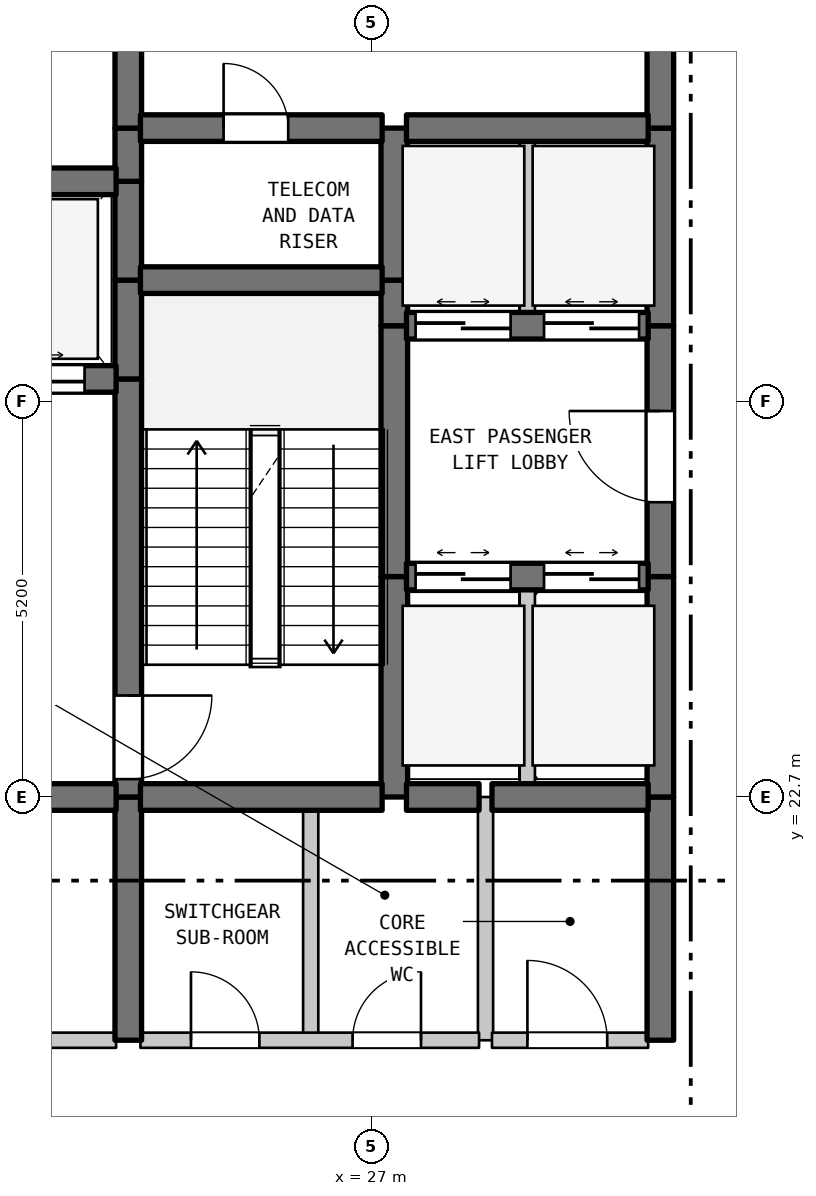
"""IFC4 building model, lengths in metres.
Left out: names, types, materials, properties, quantities, classifications, styles, units other than length and angle.
Written with IfcOpenShell. Run it as: python <this file> out.ifc"""

import sys

from ifc_helpers import new_model, si_unit, direction, frame, frame_2d, origin, place, context, subcontext, project, spatial, rectangle, extrude, element, fill, save


model = new_model("IFC4")
c1 = context("Model", 3, precision=1e-05, world=origin(), true_north=direction((0.0, 1.0)))
c2 = subcontext(c1, "Body", "Model", "MODEL_VIEW")
j1 = project(units=[si_unit("LENGTHUNIT", "METRE"), si_unit("PLANEANGLEUNIT", "RADIAN")], contexts=[c1])
p1 = place(None, origin())
s1 = spatial("IfcSite", under=j1, at=p1, CompositionType="ELEMENT")
p2 = place(p1, origin())
s2 = spatial("IfcBuilding", under=s1, at=p2, CompositionType="ELEMENT")
p3 = place(p2, frame((0.0, 0.0, 120.5)))
s3 = spatial("IfcBuildingStorey", under=s2, at=p3, CompositionType="ELEMENT", Elevation=120.5)
p4 = place(p3, frame((23.8, 19.5, 0.0), z_axis=(0.0, 0.0, 1.0), x_axis=(0.0, 1.0, 0.0)))
e1 = element("IfcWall", 1, at=p4, inside=s3, PredefinedType="SHEAR", context=c2, shape_type="SweptSolid", body=[
    extrude(rectangle(XDim=3.2, YDim=0.35, at=frame_2d((1.6, 0.0))), origin(), (0.0, 0.0, 1.0), 4.48),
])
p5 = place(p3, frame((23.8, 22.7, 0.0), z_axis=(0.0, 0.0, 1.0), x_axis=(0.0, 1.0, 0.0)))
e2 = element("IfcWall", 2, at=p5, inside=s3, PredefinedType="SHEAR", context=c2, shape_type="SweptSolid", body=[
    extrude(rectangle(XDim=5.5, YDim=0.35, at=frame_2d((2.75, 0.0))), origin(), (0.0, 0.0, 1.0), 4.48),
])
p6 = place(p5, frame((0.235, 0.0, 0.0)))
e3 = element("IfcOpeningElement", 3, at=p6, cuts=e2, PredefinedType="OPENING", context=c2, shape_type="SweptSolid", body=[
    extrude(rectangle(XDim=1.1, YDim=2.15, at=frame_2d((0.55, 1.075))), frame((0.0, 0.185, 0.0), z_axis=(0.0, -1.0, 0.0), x_axis=(1.0, 0.0, 0.0)), (0.0, 0.0, 1.0), 0.37),
])
for number, where, z_axis, x_axis in (
    (4, (23.8, 28.2, 0.0), (0.0, 0.0, 1.0), (0.0, 1.0, 0.0)),
    (5, (23.8, 29.5, 0.0), (0.0, 0.0, 1.0), (0.0, 1.0, 0.0)),
):
    element("IfcWall", number, at=place(p3, frame(where, z_axis=z_axis, x_axis=x_axis)), inside=s3, PredefinedType="SHEAR", context=c2, shape_type="SweptSolid", body=[
        extrude(rectangle(XDim=1.3, YDim=0.35, at=frame_2d((0.65, 0.0))), origin(), (0.0, 0.0, 1.0), 4.48),
    ])
p7 = place(p3, frame((23.8, 30.8, 0.0), z_axis=(0.0, 0.0, 1.0), x_axis=(0.0, 1.0, 0.0)))
e6 = element("IfcWall", 6, at=p7, inside=s3, PredefinedType="SHEAR", context=c2, shape_type="SweptSolid", body=[
    extrude(rectangle(XDim=0.7, YDim=0.35, at=frame_2d((0.35, 0.0))), origin(), (0.0, 0.0, 1.0), 4.48),
])
p8 = place(p3, frame((23.8, 31.5, 0.0), z_axis=(0.0, 0.0, 1.0), x_axis=(0.0, 1.0, 0.0)))
e7 = element("IfcWall", 7, at=p8, inside=s3, PredefinedType="SHEAR", context=c2, shape_type="SweptSolid", body=[
    extrude(rectangle(XDim=3.5, YDim=0.35, at=frame_2d((1.75, 0.0))), origin(), (0.0, 0.0, 1.0), 4.48),
])
p9 = place(p8, frame((1.127, 0.0, 0.0)))
e8 = element("IfcOpeningElement", 8, at=p9, cuts=e7, PredefinedType="OPENING", context=c2, shape_type="SweptSolid", body=[
    extrude(rectangle(XDim=1.1, YDim=2.15, at=frame_2d((0.55, 1.075))), frame((0.0, 0.185, 0.0), z_axis=(0.0, -1.0, 0.0), x_axis=(1.0, 0.0, 0.0)), (0.0, 0.0, 1.0), 0.37),
])
p10 = place(p3, frame((26.2, 19.5, 0.0), z_axis=(0.0, 0.0, 1.0), x_axis=(0.0, 1.0, 0.0)))
e9 = element("IfcWall", 9, at=p10, inside=s3, PredefinedType="STANDARD", context=c2, shape_type="SweptSolid", body=[
    extrude(rectangle(XDim=3.2, YDim=0.2, at=frame_2d((1.6, 0.0))), origin(), (0.0, 0.0, 1.0), 4.48),
])
p11 = place(p3, frame((27.3, 22.7, 0.0), z_axis=(0.0, 0.0, 1.0), x_axis=(0.0, 1.0, 0.0)))
e10 = element("IfcWall", 10, at=p11, inside=s3, PredefinedType="SHEAR", context=c2, shape_type="SweptSolid", body=[
    extrude(rectangle(XDim=2.9, YDim=0.35, at=frame_2d((1.45, 0.0))), origin(), (0.0, 0.0, 1.0), 4.48),
])
p12 = place(p3, frame((27.3, 25.6, 0.0), z_axis=(0.0, 0.0, 1.0), x_axis=(0.0, 1.0, 0.0)))
e11 = element("IfcWall", 11, at=p12, inside=s3, PredefinedType="SHEAR", context=c2, shape_type="SweptSolid", body=[
    extrude(rectangle(XDim=3.3, YDim=0.35, at=frame_2d((1.65, 0.0))), origin(), (0.0, 0.0, 1.0), 4.48),
])
p13 = place(p3, frame((27.3, 28.9, 0.0), z_axis=(0.0, 0.0, 1.0), x_axis=(0.0, 1.0, 0.0)))
e12 = element("IfcWall", 12, at=p13, inside=s3, PredefinedType="SHEAR", context=c2, shape_type="SweptSolid", body=[
    extrude(rectangle(XDim=0.6, YDim=0.35, at=frame_2d((0.3, 0.0))), origin(), (0.0, 0.0, 1.0), 4.48),
])
p14 = place(p3, frame((27.3, 29.5, 0.0), z_axis=(0.0, 0.0, 1.0), x_axis=(0.0, 1.0, 0.0)))
e13 = element("IfcWall", 13, at=p14, inside=s3, PredefinedType="SHEAR", context=c2, shape_type="SweptSolid", body=[
    extrude(rectangle(XDim=2.0, YDim=0.35, at=frame_2d((1.0, 0.0))), origin(), (0.0, 0.0, 1.0), 4.48),
])
p15 = place(p3, frame((28.5, 19.5, 0.0), z_axis=(0.0, 0.0, 1.0), x_axis=(0.0, 1.0, 0.0)))
e14 = element("IfcWall", 14, at=p15, inside=s3, PredefinedType="STANDARD", context=c2, shape_type="SweptSolid", body=[
    extrude(rectangle(XDim=3.2, YDim=0.2, at=frame_2d((1.6, 0.0))), origin(), (0.0, 0.0, 1.0), 4.48),
])
p16 = place(p3, frame((29.05, 22.7, 0.0), z_axis=(0.0, 0.0, 1.0), x_axis=(0.0, 1.0, 0.0)))
e15 = element("IfcWall", 15, at=p16, inside=s3, PredefinedType="STANDARD", context=c2, shape_type="SweptSolid", body=[
    extrude(rectangle(XDim=2.9, YDim=0.2, at=frame_2d((1.45, 0.0))), origin(), (0.0, 0.0, 1.0), 4.48),
])
p17 = place(p3, frame((29.05, 28.9, 0.0), z_axis=(0.0, 0.0, 1.0), x_axis=(0.0, 1.0, 0.0)))
e16 = element("IfcWall", 16, at=p17, inside=s3, PredefinedType="STANDARD", context=c2, shape_type="SweptSolid", body=[
    extrude(rectangle(XDim=2.6, YDim=0.2, at=frame_2d((1.3, 0.0))), origin(), (0.0, 0.0, 1.0), 4.48),
])
p18 = place(p3, frame((30.8, 19.5, 0.0), z_axis=(0.0, 0.0, 1.0), x_axis=(0.0, 1.0, 0.0)))
e17 = element("IfcWall", 17, at=p18, inside=s3, PredefinedType="SHEAR", context=c2, shape_type="SweptSolid", body=[
    extrude(rectangle(XDim=3.2, YDim=0.35, at=frame_2d((1.6, 0.0))), origin(), (0.0, 0.0, 1.0), 4.48),
])
p19 = place(p3, frame((30.8, 22.7, 0.0), z_axis=(0.0, 0.0, 1.0), x_axis=(0.0, 1.0, 0.0)))
e18 = element("IfcWall", 18, at=p19, inside=s3, PredefinedType="SHEAR", context=c2, shape_type="SweptSolid", body=[
    extrude(rectangle(XDim=2.9, YDim=0.35, at=frame_2d((1.45, 0.0))), origin(), (0.0, 0.0, 1.0), 4.48),
])
p20 = place(p3, frame((30.8, 25.6, 0.0), z_axis=(0.0, 0.0, 1.0), x_axis=(0.0, 1.0, 0.0)))
e19 = element("IfcWall", 19, at=p20, inside=s3, PredefinedType="SHEAR", context=c2, shape_type="SweptSolid", body=[
    extrude(rectangle(XDim=3.3, YDim=0.35, at=frame_2d((1.65, 0.0))), origin(), (0.0, 0.0, 1.0), 4.48),
])
p21 = place(p20, frame((0.978, 0.0, 0.0)))
e20 = element("IfcOpeningElement", 20, at=p21, cuts=e19, PredefinedType="OPENING", context=c2, shape_type="SweptSolid", body=[
    extrude(rectangle(XDim=1.2, YDim=2.2, at=frame_2d((0.6, 1.1))), frame((0.0, 0.185, 0.0), z_axis=(0.0, -1.0, 0.0), x_axis=(1.0, 0.0, 0.0)), (0.0, 0.0, 1.0), 0.37),
])
p22 = place(p3, frame((30.8, 28.9, 0.0), z_axis=(0.0, 0.0, 1.0), x_axis=(0.0, 1.0, 0.0)))
e21 = element("IfcWall", 21, at=p22, inside=s3, PredefinedType="SHEAR", context=c2, shape_type="SweptSolid", body=[
    extrude(rectangle(XDim=2.6, YDim=0.35, at=frame_2d((1.3, 0.0))), origin(), (0.0, 0.0, 1.0), 4.48),
])
p23 = place(p3, frame((30.8, 31.5, 0.0), z_axis=(0.0, 0.0, 1.0), x_axis=(0.0, 1.0, 0.0)))
e22 = element("IfcWall", 22, at=p23, inside=s3, PredefinedType="SHEAR", context=c2, shape_type="SweptSolid", body=[
    extrude(rectangle(XDim=3.5, YDim=0.35, at=frame_2d((1.75, 0.0))), origin(), (0.0, 0.0, 1.0), 4.48),
])
p24 = place(p23, frame((1.15, 0.0, 0.0)))
e23 = element("IfcOpeningElement", 23, at=p24, cuts=e22, PredefinedType="OPENING", context=c2, shape_type="SweptSolid", body=[
    extrude(rectangle(XDim=1.2, YDim=2.2, at=frame_2d((0.6, 1.1))), frame((0.0, 0.185, 0.0), z_axis=(0.0, -1.0, 0.0), x_axis=(1.0, 0.0, 0.0)), (0.0, 0.0, 1.0), 0.37),
])
p25 = place(p3, frame((19.16, 19.5, 0.0), z_axis=(0.0, 0.0, 1.0), x_axis=(1.0, 0.0, 0.0)))
e24 = element("IfcWall", 24, at=p25, inside=s3, PredefinedType="STANDARD", context=c2, shape_type="SweptSolid", body=[
    extrude(rectangle(XDim=4.48, YDim=0.2, at=frame_2d((2.24, 0.0))), origin(), (0.0, 0.0, 1.0), 4.48),
])
p26 = place(p25, frame((1.64, 0.0, 0.0)))
e25 = element("IfcOpeningElement", 25, at=p26, cuts=e24, PredefinedType="OPENING", context=c2, shape_type="SweptSolid", body=[
    extrude(rectangle(XDim=1.2, YDim=2.2, at=frame_2d((0.6, 1.1))), frame((0.0, 0.11, 0.0), z_axis=(0.0, -1.0, 0.0), x_axis=(1.0, 0.0, 0.0)), (0.0, 0.0, 1.0), 0.22),
])
p27 = place(p3, frame((23.96, 19.5, 0.0), z_axis=(0.0, 0.0, 1.0), x_axis=(1.0, 0.0, 0.0)))
e26 = element("IfcWall", 26, at=p27, inside=s3, PredefinedType="STANDARD", context=c2, shape_type="SweptSolid", body=[
    extrude(rectangle(XDim=4.455, YDim=0.2, at=frame_2d((2.228, 0.0))), origin(), (0.0, 0.0, 1.0), 4.48),
])
p28 = place(p27, frame((0.665, 0.0, 0.0)))
e27 = element("IfcOpeningElement", 27, at=p28, cuts=e26, PredefinedType="OPENING", context=c2, shape_type="SweptSolid", body=[
    extrude(rectangle(XDim=0.9, YDim=2.15, at=frame_2d((0.45, 1.075))), frame((0.0, 0.11, 0.0), z_axis=(0.0, -1.0, 0.0), x_axis=(1.0, 0.0, 0.0)), (0.0, 0.0, 1.0), 0.22),
])
p29 = place(p27, frame((2.791, 0.0, 0.0)))
e28 = element("IfcOpeningElement", 28, at=p29, cuts=e26, PredefinedType="OPENING", context=c2, shape_type="SweptSolid", body=[
    extrude(rectangle(XDim=0.9, YDim=2.15, at=frame_2d((0.45, 1.075))), frame((0.0, 0.11, 0.0), z_axis=(0.0, -1.0, 0.0), x_axis=(1.0, 0.0, 0.0)), (0.0, 0.0, 1.0), 0.22),
])
p30 = place(p3, frame((28.585, 19.5, 0.0), z_axis=(0.0, 0.0, 1.0), x_axis=(1.0, 0.0, 0.0)))
e29 = element("IfcWall", 29, at=p30, inside=s3, PredefinedType="STANDARD", context=c2, shape_type="SweptSolid", body=[
    extrude(rectangle(XDim=2.055, YDim=0.2, at=frame_2d((1.027, 0.0))), origin(), (0.0, 0.0, 1.0), 4.48),
])
p31 = place(p30, frame((0.466, 0.0, 0.0)))
e30 = element("IfcOpeningElement", 30, at=p31, cuts=e29, PredefinedType="OPENING", context=c2, shape_type="SweptSolid", body=[
    extrude(rectangle(XDim=1.05, YDim=2.15, at=frame_2d((0.525, 1.075))), frame((0.0, 0.11, 0.0), z_axis=(0.0, -1.0, 0.0), x_axis=(1.0, 0.0, 0.0)), (0.0, 0.0, 1.0), 0.22),
])
p32 = place(p3, frame((19.16, 22.7, 0.0), z_axis=(0.0, 0.0, 1.0), x_axis=(1.0, 0.0, 0.0)))
e31 = element("IfcWall", 31, at=p32, inside=s3, PredefinedType="SHEAR", context=c2, shape_type="SweptSolid", body=[
    extrude(rectangle(XDim=4.48, YDim=0.35, at=frame_2d((2.24, 0.0))), origin(), (0.0, 0.0, 1.0), 4.48),
])
p33 = place(p32, frame((1.64, 0.0, 0.0)))
e32 = element("IfcOpeningElement", 32, at=p33, cuts=e31, PredefinedType="OPENING", context=c2, shape_type="SweptSolid", body=[
    extrude(rectangle(XDim=1.2, YDim=2.2, at=frame_2d((0.6, 1.1))), frame((0.0, 0.185, 0.0), z_axis=(0.0, -1.0, 0.0), x_axis=(1.0, 0.0, 0.0)), (0.0, 0.0, 1.0), 0.37),
])
p34 = place(p3, frame((23.96, 22.7, 0.0), z_axis=(0.0, 0.0, 1.0), x_axis=(1.0, 0.0, 0.0)))
e33 = element("IfcWall", 33, at=p34, inside=s3, PredefinedType="SHEAR", context=c2, shape_type="SweptSolid", body=[
    extrude(rectangle(XDim=3.18, YDim=0.35, at=frame_2d((1.59, 0.0))), origin(), (0.0, 0.0, 1.0), 4.48),
])
p35 = place(p3, frame((27.46, 22.7, 0.0), z_axis=(0.0, 0.0, 1.0), x_axis=(1.0, 0.0, 0.0)))
e34 = element("IfcWall", 34, at=p35, inside=s3, PredefinedType="SHEAR", context=c2, shape_type="SweptSolid", body=[
    extrude(rectangle(XDim=0.955, YDim=0.35, at=frame_2d((0.478, 0.0))), origin(), (0.0, 0.0, 1.0), 4.48),
])
p36 = place(p3, frame((28.585, 22.7, 0.0), z_axis=(0.0, 0.0, 1.0), x_axis=(1.0, 0.0, 0.0)))
e35 = element("IfcWall", 35, at=p36, inside=s3, PredefinedType="SHEAR", context=c2, shape_type="SweptSolid", body=[
    extrude(rectangle(XDim=2.055, YDim=0.35, at=frame_2d((1.027, 0.0))), origin(), (0.0, 0.0, 1.0), 4.48),
])
p37 = place(p3, frame((27.46, 25.6, 0.0), z_axis=(0.0, 0.0, 1.0), x_axis=(1.0, 0.0, 0.0)))
e36 = element("IfcWall", 36, at=p37, inside=s3, PredefinedType="SHEAR", context=c2, shape_type="SweptSolid", body=[
    extrude(rectangle(XDim=3.18, YDim=0.35, at=frame_2d((1.59, 0.0))), origin(), (0.0, 0.0, 1.0), 4.48),
])
p38 = place(p37, frame((0.12, 0.0, 0.0)))
e37 = element("IfcOpeningElement", 37, at=p38, cuts=e36, PredefinedType="OPENING", context=c2, shape_type="SweptSolid", body=[
    extrude(rectangle(XDim=1.25, YDim=2.2, at=frame_2d((0.625, 1.1))), frame((0.0, 0.185, 0.0), z_axis=(0.0, -1.0, 0.0), x_axis=(1.0, 0.0, 0.0)), (0.0, 0.0, 1.0), 0.37),
])
p39 = place(p37, frame((1.81, 0.0, 0.0)))
e38 = element("IfcOpeningElement", 38, at=p39, cuts=e36, PredefinedType="OPENING", context=c2, shape_type="SweptSolid", body=[
    extrude(rectangle(XDim=1.25, YDim=2.2, at=frame_2d((0.625, 1.1))), frame((0.0, 0.185, 0.0), z_axis=(0.0, -1.0, 0.0), x_axis=(1.0, 0.0, 0.0)), (0.0, 0.0, 1.0), 0.37),
])
p40 = place(p3, frame((19.16, 28.2, 0.0), z_axis=(0.0, 0.0, 1.0), x_axis=(1.0, 0.0, 0.0)))
e39 = element("IfcWall", 39, at=p40, inside=s3, PredefinedType="SHEAR", context=c2, shape_type="SweptSolid", body=[
    extrude(rectangle(XDim=4.48, YDim=0.35, at=frame_2d((2.24, 0.0))), origin(), (0.0, 0.0, 1.0), 4.48),
])
p41 = place(p40, frame((0.415, 0.0, 0.0)))
e40 = element("IfcOpeningElement", 40, at=p41, cuts=e39, PredefinedType="OPENING", context=c2, shape_type="SweptSolid", body=[
    extrude(rectangle(XDim=1.25, YDim=2.2, at=frame_2d((0.625, 1.1))), frame((0.0, 0.185, 0.0), z_axis=(0.0, -1.0, 0.0), x_axis=(1.0, 0.0, 0.0)), (0.0, 0.0, 1.0), 0.37),
])
p42 = place(p40, frame((2.815, 0.0, 0.0)))
e41 = element("IfcOpeningElement", 41, at=p42, cuts=e39, PredefinedType="OPENING", context=c2, shape_type="SweptSolid", body=[
    extrude(rectangle(XDim=1.25, YDim=2.2, at=frame_2d((0.625, 1.1))), frame((0.0, 0.185, 0.0), z_axis=(0.0, -1.0, 0.0), x_axis=(1.0, 0.0, 0.0)), (0.0, 0.0, 1.0), 0.37),
])
p43 = place(p3, frame((27.46, 28.9, 0.0), z_axis=(0.0, 0.0, 1.0), x_axis=(1.0, 0.0, 0.0)))
e42 = element("IfcWall", 42, at=p43, inside=s3, PredefinedType="SHEAR", context=c2, shape_type="SweptSolid", body=[
    extrude(rectangle(XDim=3.18, YDim=0.35, at=frame_2d((1.59, 0.0))), origin(), (0.0, 0.0, 1.0), 4.48),
])
p44 = place(p43, frame((0.12, 0.0, 0.0)))
e43 = element("IfcOpeningElement", 43, at=p44, cuts=e42, PredefinedType="OPENING", context=c2, shape_type="SweptSolid", body=[
    extrude(rectangle(XDim=1.25, YDim=2.2, at=frame_2d((0.625, 1.1))), frame((0.0, 0.185, 0.0), z_axis=(0.0, -1.0, 0.0), x_axis=(1.0, 0.0, 0.0)), (0.0, 0.0, 1.0), 0.37),
])
p45 = place(p43, frame((1.81, 0.0, 0.0)))
e44 = element("IfcOpeningElement", 44, at=p45, cuts=e42, PredefinedType="OPENING", context=c2, shape_type="SweptSolid", body=[
    extrude(rectangle(XDim=1.25, YDim=2.2, at=frame_2d((0.625, 1.1))), frame((0.0, 0.185, 0.0), z_axis=(0.0, -1.0, 0.0), x_axis=(1.0, 0.0, 0.0)), (0.0, 0.0, 1.0), 0.37),
])
p46 = place(p3, frame((23.96, 29.5, 0.0), z_axis=(0.0, 0.0, 1.0), x_axis=(1.0, 0.0, 0.0)))
e45 = element("IfcWall", 45, at=p46, inside=s3, PredefinedType="SHEAR", context=c2, shape_type="SweptSolid", body=[
    extrude(rectangle(XDim=3.18, YDim=0.35, at=frame_2d((1.59, 0.0))), origin(), (0.0, 0.0, 1.0), 4.48),
])
p47 = place(p3, frame((19.16, 30.8, 0.0), z_axis=(0.0, 0.0, 1.0), x_axis=(1.0, 0.0, 0.0)))
e46 = element("IfcWall", 46, at=p47, inside=s3, PredefinedType="SHEAR", context=c2, shape_type="SweptSolid", body=[
    extrude(rectangle(XDim=4.48, YDim=0.35, at=frame_2d((2.24, 0.0))), origin(), (0.0, 0.0, 1.0), 4.48),
])
p48 = place(p3, frame((23.96, 31.5, 0.0), z_axis=(0.0, 0.0, 1.0), x_axis=(1.0, 0.0, 0.0)))
e47 = element("IfcWall", 47, at=p48, inside=s3, PredefinedType="SHEAR", context=c2, shape_type="SweptSolid", body=[
    extrude(rectangle(XDim=3.18, YDim=0.35, at=frame_2d((1.59, 0.0))), origin(), (0.0, 0.0, 1.0), 4.48),
])
p49 = place(p48, frame((1.094, 0.0, 0.0)))
e48 = element("IfcOpeningElement", 48, at=p49, cuts=e47, PredefinedType="OPENING", context=c2, shape_type="SweptSolid", body=[
    extrude(rectangle(XDim=0.85, YDim=2.1, at=frame_2d((0.425, 1.05))), frame((0.0, 0.185, 0.0), z_axis=(0.0, -1.0, 0.0), x_axis=(1.0, 0.0, 0.0)), (0.0, 0.0, 1.0), 0.37),
])
p50 = place(p3, frame((27.46, 31.5, 0.0), z_axis=(0.0, 0.0, 1.0), x_axis=(1.0, 0.0, 0.0)))
e49 = element("IfcWall", 49, at=p50, inside=s3, PredefinedType="SHEAR", context=c2, shape_type="SweptSolid", body=[
    extrude(rectangle(XDim=3.18, YDim=0.35, at=frame_2d((1.59, 0.0))), origin(), (0.0, 0.0, 1.0), 4.48),
])
p51 = place(p6, frame((1.1, 0.0, 0.0), z_axis=(0.0, 0.0, 1.0), x_axis=(-1.0, 0.0, 0.0)))
e50 = element("IfcDoor", 50, at=p51, inside=s3, OperationType="SINGLE_SWING_RIGHT", PredefinedType="DOOR", context=c2, shape_type="SweptSolid", body=[
    extrude(rectangle(XDim=1.1, YDim=2.15, at=frame_2d((0.55, 1.075))), frame((0.0, 0.025, 0.0), z_axis=(0.0, -1.0, 0.0), x_axis=(1.0, 0.0, 0.0)), (0.0, 0.0, 1.0), 0.05),
])
fill(e3, e50)
p52 = place(p21, origin())
e51 = element("IfcDoor", 51, at=p52, inside=s3, OperationType="SINGLE_SWING_RIGHT", PredefinedType="DOOR", context=c2, shape_type="SweptSolid", body=[
    extrude(rectangle(XDim=1.2, YDim=2.2, at=frame_2d((0.6, 1.1))), frame((0.0, 0.025, 0.0), z_axis=(0.0, -1.0, 0.0), x_axis=(1.0, 0.0, 0.0)), (0.0, 0.0, 1.0), 0.05),
])
fill(e20, e51)
p53 = place(p28, origin())
e52 = element("IfcDoor", 52, at=p53, inside=s3, OperationType="SINGLE_SWING_LEFT", PredefinedType="DOOR", context=c2, shape_type="SweptSolid", body=[
    extrude(rectangle(XDim=0.9, YDim=2.15, at=frame_2d((0.45, 1.075))), frame((0.0, 0.025, 0.0), z_axis=(0.0, -1.0, 0.0), x_axis=(1.0, 0.0, 0.0)), (0.0, 0.0, 1.0), 0.05),
])
fill(e27, e52)
p54 = place(p29, origin())
e53 = element("IfcDoor", 53, at=p54, inside=s3, OperationType="SINGLE_SWING_RIGHT", PredefinedType="DOOR", context=c2, shape_type="SweptSolid", body=[
    extrude(rectangle(XDim=0.9, YDim=2.15, at=frame_2d((0.45, 1.075))), frame((0.0, 0.025, 0.0), z_axis=(0.0, -1.0, 0.0), x_axis=(1.0, 0.0, 0.0)), (0.0, 0.0, 1.0), 0.05),
])
fill(e28, e53)
p55 = place(p31, origin())
e54 = element("IfcDoor", 54, at=p55, inside=s3, OperationType="SINGLE_SWING_LEFT", PredefinedType="DOOR", context=c2, shape_type="SweptSolid", body=[
    extrude(rectangle(XDim=1.05, YDim=2.15, at=frame_2d((0.525, 1.075))), frame((0.0, 0.025, 0.0), z_axis=(0.0, -1.0, 0.0), x_axis=(1.0, 0.0, 0.0)), (0.0, 0.0, 1.0), 0.05),
])
fill(e30, e54)
p56 = place(p38, origin())
e55 = element("IfcDoor", 55, at=p56, inside=s3, OperationType="DOUBLE_DOOR_SLIDING", PredefinedType="DOOR", context=c2, shape_type="SweptSolid", body=[
    extrude(rectangle(XDim=1.25, YDim=2.2, at=frame_2d((0.625, 1.1))), frame((0.0, 0.025, 0.0), z_axis=(0.0, -1.0, 0.0), x_axis=(1.0, 0.0, 0.0)), (0.0, 0.0, 1.0), 0.05),
])
fill(e37, e55)
p57 = place(p39, origin())
e56 = element("IfcDoor", 56, at=p57, inside=s3, OperationType="DOUBLE_DOOR_SLIDING", PredefinedType="DOOR", context=c2, shape_type="SweptSolid", body=[
    extrude(rectangle(XDim=1.25, YDim=2.2, at=frame_2d((0.625, 1.1))), frame((0.0, 0.025, 0.0), z_axis=(0.0, -1.0, 0.0), x_axis=(1.0, 0.0, 0.0)), (0.0, 0.0, 1.0), 0.05),
])
fill(e38, e56)
p58 = place(p42, origin())
e57 = element("IfcDoor", 57, at=p58, inside=s3, OperationType="DOUBLE_DOOR_SLIDING", PredefinedType="DOOR", context=c2, shape_type="SweptSolid", body=[
    extrude(rectangle(XDim=1.25, YDim=2.2, at=frame_2d((0.625, 1.1))), frame((0.0, 0.025, 0.0), z_axis=(0.0, -1.0, 0.0), x_axis=(1.0, 0.0, 0.0)), (0.0, 0.0, 1.0), 0.05),
])
fill(e41, e57)
p59 = place(p44, origin())
e58 = element("IfcDoor", 58, at=p59, inside=s3, OperationType="DOUBLE_DOOR_SLIDING", PredefinedType="DOOR", context=c2, shape_type="SweptSolid", body=[
    extrude(rectangle(XDim=1.25, YDim=2.2, at=frame_2d((0.625, 1.1))), frame((0.0, 0.025, 0.0), z_axis=(0.0, -1.0, 0.0), x_axis=(1.0, 0.0, 0.0)), (0.0, 0.0, 1.0), 0.05),
])
fill(e43, e58)
p60 = place(p45, origin())
e59 = element("IfcDoor", 59, at=p60, inside=s3, OperationType="DOUBLE_DOOR_SLIDING", PredefinedType="DOOR", context=c2, shape_type="SweptSolid", body=[
    extrude(rectangle(XDim=1.25, YDim=2.2, at=frame_2d((0.625, 1.1))), frame((0.0, 0.025, 0.0), z_axis=(0.0, -1.0, 0.0), x_axis=(1.0, 0.0, 0.0)), (0.0, 0.0, 1.0), 0.05),
])
fill(e44, e59)
p61 = place(p49, origin())
e60 = element("IfcDoor", 60, at=p61, inside=s3, OperationType="SINGLE_SWING_LEFT", PredefinedType="DOOR", context=c2, shape_type="SweptSolid", body=[
    extrude(rectangle(XDim=0.85, YDim=2.1, at=frame_2d((0.425, 1.05))), frame((0.0, 0.025, 0.0), z_axis=(0.0, -1.0, 0.0), x_axis=(1.0, 0.0, 0.0)), (0.0, 0.0, 1.0), 0.05),
])
fill(e48, e60)
save(model, sys.argv[1])
